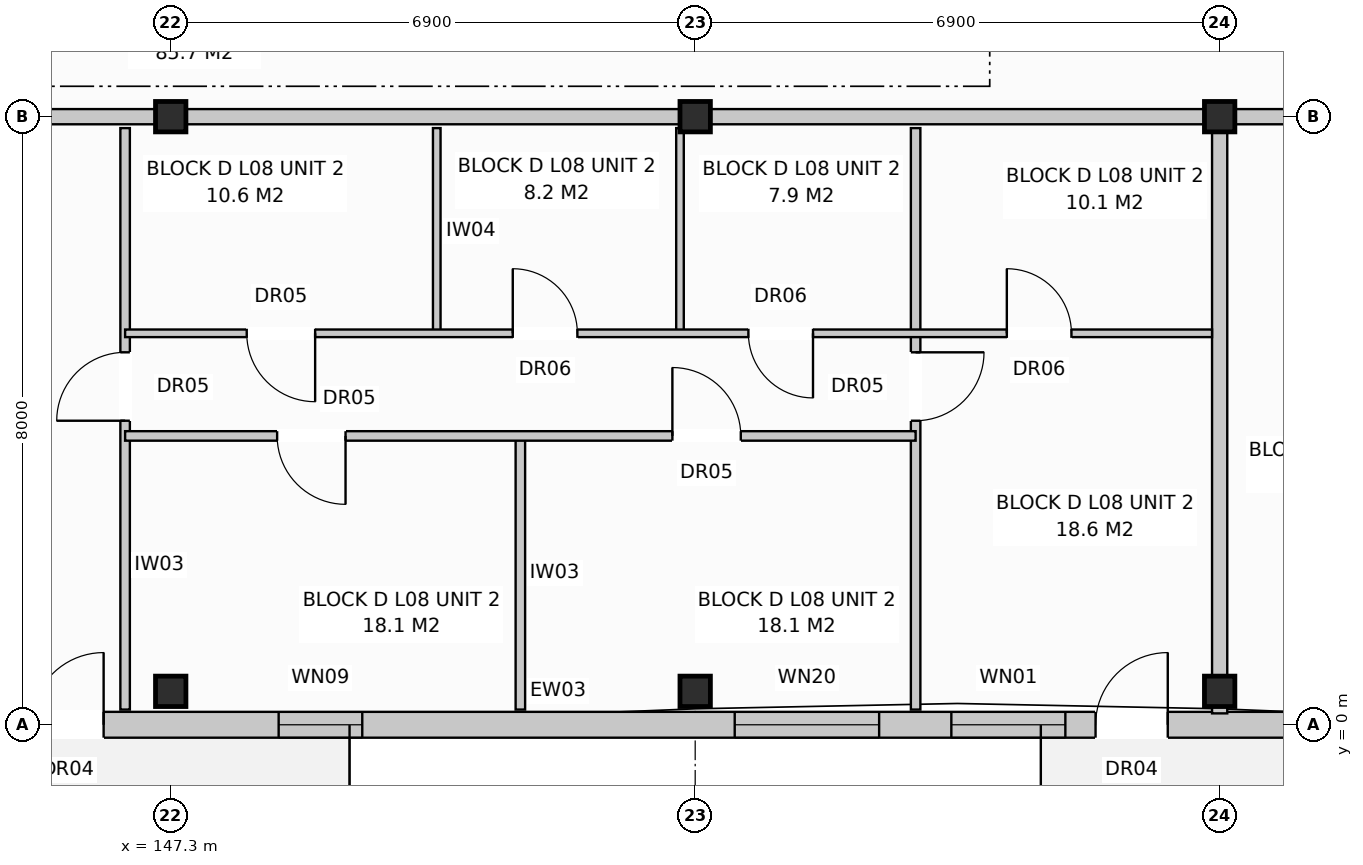
"""IFC4 building model, lengths in metres.
Left out: names, types, materials, properties, quantities, classifications, styles, units other than length and angle.
Written with IfcOpenShell. Run it as: python <this file> out.ifc"""

import sys

from ifc_helpers import new_model, si_unit, direction, frame, frame_2d, origin, origin_with_axes, origin_2d, place, context, subcontext, project, spatial, rectangle, extrude, element, fill, save


model = new_model("IFC4")
c1 = context("Model", 3, precision=1e-05, world=origin(), true_north=direction((0.0, 1.0)))
c2 = subcontext(c1, "Body", "Model", "MODEL_VIEW")
j1 = project(units=[si_unit("LENGTHUNIT", "METRE"), si_unit("PLANEANGLEUNIT", "RADIAN")], contexts=[c1])
p1 = place(None, origin())
s1 = spatial("IfcSite", under=j1, at=p1, CompositionType="ELEMENT")
p2 = place(p1, origin())
s2 = spatial("IfcBuilding", under=s1, at=p2, CompositionType="ELEMENT")
p3 = place(p2, frame((0.0, 0.0, 27.2)))
s3 = spatial("IfcBuildingStorey", under=s2, at=p3, CompositionType="ELEMENT", Elevation=27.2)
for number, where, z_axis, x_axis in (
    (1, (147.3, 0.44, 0.0), (0.0, 0.0, 1.0), (1.0, 0.0, 0.0)),
    (2, (147.3, 8.0, 0.0), (0.0, 0.0, 1.0), (1.0, 0.0, 0.0)),
    (3, (154.2, 0.44, 0.0), (0.0, 0.0, 1.0), (1.0, 0.0, 0.0)),
    (4, (154.2, 8.0, 0.0), (0.0, 0.0, 1.0), (1.0, 0.0, 0.0)),
    (5, (161.1, 0.44, 0.0), (0.0, 0.0, 1.0), (1.0, 0.0, 0.0)),
    (6, (161.1, 8.0, 0.0), (0.0, 0.0, 1.0), (1.0, 0.0, 0.0)),
):
    element("IfcColumn", number, at=place(p3, frame(where, z_axis=z_axis, x_axis=x_axis)), inside=s3, PredefinedType="COLUMN", context=c2, shape_type="SweptSolid", body=[
        extrude(rectangle(XDim=0.4, YDim=0.4, at=origin_2d()), origin(), (0.0, 0.0, 1.0), 3.2),
    ])
p4 = place(p3, frame((126.76, 0.0, 0.0), z_axis=(0.0, 0.0, 1.0), x_axis=(1.0, 0.0, 0.0)))
e7 = element("IfcWall", 7, at=p4, inside=s3, PredefinedType="STANDARD", context=c2, shape_type="SweptSolid", body=[
    extrude(rectangle(XDim=41.08, YDim=0.34, at=frame_2d((20.54, 0.0))), origin(), (0.0, 0.0, 1.0), 2.91),
])
p5 = place(p4, frame((7.41, 0.0, 0.0)))
e8 = element("IfcOpeningElement", 8, at=p5, cuts=e7, PredefinedType="OPENING", context=c2, shape_type="SweptSolid", body=[
    extrude(rectangle(XDim=0.95, YDim=2.1, at=frame_2d((0.475, 1.05))), frame((0.0, 0.182, 0.0), z_axis=(0.0, -1.0, 0.0), x_axis=(1.0, 0.0, 0.0)), (0.0, 0.0, 1.0), 0.364),
])
p6 = place(p4, frame((18.707, 0.0, 0.0)))
e9 = element("IfcOpeningElement", 9, at=p6, cuts=e7, PredefinedType="OPENING", context=c2, shape_type="SweptSolid", body=[
    extrude(rectangle(XDim=0.95, YDim=2.1, at=frame_2d((0.475, 1.05))), frame((0.0, 0.182, 0.0), z_axis=(0.0, -1.0, 0.0), x_axis=(1.0, 0.0, 0.0)), (0.0, 0.0, 1.0), 0.364),
])
p7 = place(p4, frame((32.707, 0.0, 0.0)))
e10 = element("IfcOpeningElement", 10, at=p7, cuts=e7, PredefinedType="OPENING", context=c2, shape_type="SweptSolid", body=[
    extrude(rectangle(XDim=0.95, YDim=2.1, at=frame_2d((0.475, 1.05))), frame((0.0, 0.182, 0.0), z_axis=(0.0, -1.0, 0.0), x_axis=(1.0, 0.0, 0.0)), (0.0, 0.0, 1.0), 0.364),
])
p8 = place(p4, frame((1.61, 0.0, 0.8)))
e11 = element("IfcOpeningElement", 11, at=p8, cuts=e7, PredefinedType="OPENING", context=c2, shape_type="SweptSolid", body=[
    extrude(rectangle(XDim=1.8, YDim=1.7, at=frame_2d((0.9, 0.85))), frame((0.0, 0.182, 0.0), z_axis=(0.0, -1.0, 0.0), x_axis=(1.0, 0.0, 0.0)), (0.0, 0.0, 1.0), 0.364),
])
p9 = place(p4, frame((10.46, 0.0, 0.8)))
e12 = element("IfcOpeningElement", 12, at=p9, cuts=e7, PredefinedType="OPENING", context=c2, shape_type="SweptSolid", body=[
    extrude(rectangle(XDim=1.9, YDim=1.85, at=frame_2d((0.95, 0.925))), frame((0.0, 0.182, 0.0), z_axis=(0.0, -1.0, 0.0), x_axis=(1.0, 0.0, 0.0)), (0.0, 0.0, 1.0), 0.364),
])
p10 = place(p4, frame((15.835, 0.0, 0.8)))
e13 = element("IfcOpeningElement", 13, at=p10, cuts=e7, PredefinedType="OPENING", context=c2, shape_type="SweptSolid", body=[
    extrude(rectangle(XDim=1.95, YDim=1.65, at=frame_2d((0.975, 0.825))), frame((0.0, 0.182, 0.0), z_axis=(0.0, -1.0, 0.0), x_axis=(1.0, 0.0, 0.0)), (0.0, 0.0, 1.0), 0.364),
])
p11 = place(p4, frame((21.96, 0.0, 0.72)))
e14 = element("IfcOpeningElement", 14, at=p11, cuts=e7, PredefinedType="OPENING", context=c2, shape_type="SweptSolid", body=[
    extrude(rectangle(XDim=1.1, YDim=1.5, at=frame_2d((0.55, 0.75))), frame((0.0, 0.182, 0.0), z_axis=(0.0, -1.0, 0.0), x_axis=(1.0, 0.0, 0.0)), (0.0, 0.0, 1.0), 0.364),
])
p12 = place(p4, frame((27.96, 0.0, 0.8)))
e15 = element("IfcOpeningElement", 15, at=p12, cuts=e7, PredefinedType="OPENING", context=c2, shape_type="SweptSolid", body=[
    extrude(rectangle(XDim=1.9, YDim=1.85, at=frame_2d((0.95, 0.925))), frame((0.0, 0.182, 0.0), z_axis=(0.0, -1.0, 0.0), x_axis=(1.0, 0.0, 0.0)), (0.0, 0.0, 1.0), 0.364),
])
p13 = place(p4, frame((30.81, 0.0, 0.85)))
e16 = element("IfcOpeningElement", 16, at=p13, cuts=e7, PredefinedType="OPENING", context=c2, shape_type="SweptSolid", body=[
    extrude(rectangle(XDim=1.5, YDim=1.65, at=frame_2d((0.75, 0.825))), frame((0.0, 0.182, 0.0), z_axis=(0.0, -1.0, 0.0), x_axis=(1.0, 0.0, 0.0)), (0.0, 0.0, 1.0), 0.364),
])
p14 = place(p4, frame((35.76, 0.0, 0.72)))
e17 = element("IfcOpeningElement", 17, at=p14, cuts=e7, PredefinedType="OPENING", context=c2, shape_type="SweptSolid", body=[
    extrude(rectangle(XDim=1.1, YDim=1.5, at=frame_2d((0.55, 0.75))), frame((0.0, 0.182, 0.0), z_axis=(0.0, -1.0, 0.0), x_axis=(1.0, 0.0, 0.0)), (0.0, 0.0, 1.0), 0.364),
])
p15 = place(p4, frame((38.575, 0.0, 0.8)))
e18 = element("IfcOpeningElement", 18, at=p15, cuts=e7, PredefinedType="OPENING", context=c2, shape_type="SweptSolid", body=[
    extrude(rectangle(XDim=1.9, YDim=1.85, at=frame_2d((0.95, 0.925))), frame((0.0, 0.182, 0.0), z_axis=(0.0, -1.0, 0.0), x_axis=(1.0, 0.0, 0.0)), (0.0, 0.0, 1.0), 0.364),
])
p16 = place(p3, frame((161.1, 7.85, 0.0), z_axis=(0.0, 0.0, 1.0), x_axis=(0.0, -1.0, 0.0)))
e19 = element("IfcWall", 19, at=p16, inside=s3, PredefinedType="PARTITIONING", context=c2, shape_type="SweptSolid", body=[
    extrude(rectangle(XDim=7.7, YDim=0.2, at=frame_2d((3.85, 0.0))), origin(), (0.0, 0.0, 1.0), 2.35),
])
p17 = place(p3, frame((140.4, 8.0, 0.0), z_axis=(0.0, 0.0, 1.0), x_axis=(1.0, 0.0, 0.0)))
e20 = element("IfcWall", 20, at=p17, inside=s3, PredefinedType="PARTITIONING", context=c2, shape_type="SweptSolid", body=[
    extrude(rectangle(XDim=20.7, YDim=0.2, at=frame_2d((10.35, 0.0))), origin(), (0.0, 0.0, 1.0), 2.35),
])
p18 = place(p17, frame((2.4, 0.0, 0.0)))
e21 = element("IfcOpeningElement", 21, at=p18, cuts=e20, PredefinedType="OPENING", context=c2, shape_type="SweptSolid", body=[
    extrude(rectangle(XDim=0.95, YDim=2.15, at=frame_2d((0.475, 1.075))), frame((0.0, 0.112, 0.0), z_axis=(0.0, -1.0, 0.0), x_axis=(1.0, 0.0, 0.0)), (0.0, 0.0, 1.0), 0.224),
])
p19 = place(p3, frame((146.7, 7.85, 0.0), z_axis=(0.0, 0.0, 1.0), x_axis=(0.0, -1.0, 0.0)))
e22 = element("IfcWall", 22, at=p19, inside=s3, PredefinedType="PARTITIONING", context=c2, shape_type="SweptSolid", body=[
    extrude(rectangle(XDim=7.65, YDim=0.125, at=frame_2d((3.825, 0.0))), origin(), (0.0, 0.0, 1.0), 2.96),
])
p20 = place(p19, frame((2.95, 0.0, 0.0)))
e23 = element("IfcOpeningElement", 23, at=p20, cuts=e22, PredefinedType="OPENING", context=c2, shape_type="SweptSolid", body=[
    extrude(rectangle(XDim=0.9, YDim=2.1, at=frame_2d((0.45, 1.05))), frame((0.0, 0.074, 0.0), z_axis=(0.0, -1.0, 0.0), x_axis=(1.0, 0.0, 0.0)), (0.0, 0.0, 1.0), 0.149),
])
for number, where, z_axis, x_axis in (
    (24, (150.8, 7.85, 0.0), (0.0, 0.0, 1.0), (0.0, -1.0, 0.0)),
    (25, (154.0, 7.85, 0.0), (0.0, 0.0, 1.0), (0.0, -1.0, 0.0)),
):
    element("IfcWall", number, at=place(p3, frame(where, z_axis=z_axis, x_axis=x_axis)), inside=s3, PredefinedType="PARTITIONING", context=c2, shape_type="SweptSolid", body=[
        extrude(rectangle(XDim=2.7, YDim=0.1, at=frame_2d((1.35, 0.0))), origin(), (0.0, 0.0, 1.0), 2.96),
    ])
p21 = place(p3, frame((151.9, 3.8, 0.0), z_axis=(0.0, 0.0, 1.0), x_axis=(0.0, -1.0, 0.0)))
e26 = element("IfcWall", 26, at=p21, inside=s3, PredefinedType="PARTITIONING", context=c2, shape_type="SweptSolid", body=[
    extrude(rectangle(XDim=3.6, YDim=0.125, at=frame_2d((1.8, 0.0))), origin(), (0.0, 0.0, 1.0), 2.96),
])
p22 = place(p3, frame((157.1, 7.85, 0.0), z_axis=(0.0, 0.0, 1.0), x_axis=(0.0, -1.0, 0.0)))
e27 = element("IfcWall", 27, at=p22, inside=s3, PredefinedType="PARTITIONING", context=c2, shape_type="SweptSolid", body=[
    extrude(rectangle(XDim=7.65, YDim=0.125, at=frame_2d((3.825, 0.0))), origin(), (0.0, 0.0, 1.0), 2.96),
])
p23 = place(p22, frame((2.95, 0.0, 0.0)))
e28 = element("IfcOpeningElement", 28, at=p23, cuts=e27, PredefinedType="OPENING", context=c2, shape_type="SweptSolid", body=[
    extrude(rectangle(XDim=0.9, YDim=2.1, at=frame_2d((0.45, 1.05))), frame((0.0, 0.074, 0.0), z_axis=(0.0, -1.0, 0.0), x_axis=(1.0, 0.0, 0.0)), (0.0, 0.0, 1.0), 0.149),
])
p24 = place(p3, frame((146.7, 5.15, 0.0), z_axis=(0.0, 0.0, 1.0), x_axis=(1.0, 0.0, 0.0)))
e29 = element("IfcWall", 29, at=p24, inside=s3, PredefinedType="PARTITIONING", context=c2, shape_type="SweptSolid", body=[
    extrude(rectangle(XDim=14.3, YDim=0.1, at=frame_2d((7.15, 0.0))), origin(), (0.0, 0.0, 1.0), 2.96),
])
p25 = place(p24, frame((1.6, 0.0, 0.0)))
e30 = element("IfcOpeningElement", 30, at=p25, cuts=e29, PredefinedType="OPENING", context=c2, shape_type="SweptSolid", body=[
    extrude(rectangle(XDim=0.9, YDim=2.1, at=frame_2d((0.45, 1.05))), frame((0.0, 0.062, 0.0), z_axis=(0.0, -1.0, 0.0), x_axis=(1.0, 0.0, 0.0)), (0.0, 0.0, 1.0), 0.124),
])
p26 = place(p24, frame((5.1, 0.0, 0.0)))
e31 = element("IfcOpeningElement", 31, at=p26, cuts=e29, PredefinedType="OPENING", context=c2, shape_type="SweptSolid", body=[
    extrude(rectangle(XDim=0.85, YDim=2.05, at=frame_2d((0.425, 1.025))), frame((0.0, 0.062, 0.0), z_axis=(0.0, -1.0, 0.0), x_axis=(1.0, 0.0, 0.0)), (0.0, 0.0, 1.0), 0.124),
])
p27 = place(p24, frame((8.2, 0.0, 0.0)))
e32 = element("IfcOpeningElement", 32, at=p27, cuts=e29, PredefinedType="OPENING", context=c2, shape_type="SweptSolid", body=[
    extrude(rectangle(XDim=0.85, YDim=2.05, at=frame_2d((0.425, 1.025))), frame((0.0, 0.062, 0.0), z_axis=(0.0, -1.0, 0.0), x_axis=(1.0, 0.0, 0.0)), (0.0, 0.0, 1.0), 0.124),
])
p28 = place(p24, frame((11.6, 0.0, 0.0)))
e33 = element("IfcOpeningElement", 33, at=p28, cuts=e29, PredefinedType="OPENING", context=c2, shape_type="SweptSolid", body=[
    extrude(rectangle(XDim=0.85, YDim=2.05, at=frame_2d((0.425, 1.025))), frame((0.0, 0.062, 0.0), z_axis=(0.0, -1.0, 0.0), x_axis=(1.0, 0.0, 0.0)), (0.0, 0.0, 1.0), 0.124),
])
p29 = place(p3, frame((146.7, 3.8, 0.0), z_axis=(0.0, 0.0, 1.0), x_axis=(1.0, 0.0, 0.0)))
e34 = element("IfcWall", 34, at=p29, inside=s3, PredefinedType="PARTITIONING", context=c2, shape_type="SweptSolid", body=[
    extrude(rectangle(XDim=10.4, YDim=0.125, at=frame_2d((5.2, 0.0))), origin(), (0.0, 0.0, 1.0), 2.96),
])
p30 = place(p29, frame((2.0, 0.0, 0.0)))
e35 = element("IfcOpeningElement", 35, at=p30, cuts=e34, PredefinedType="OPENING", context=c2, shape_type="SweptSolid", body=[
    extrude(rectangle(XDim=0.9, YDim=2.1, at=frame_2d((0.45, 1.05))), frame((0.0, 0.074, 0.0), z_axis=(0.0, -1.0, 0.0), x_axis=(1.0, 0.0, 0.0)), (0.0, 0.0, 1.0), 0.149),
])
p31 = place(p29, frame((7.2, 0.0, 0.0)))
e36 = element("IfcOpeningElement", 36, at=p31, cuts=e34, PredefinedType="OPENING", context=c2, shape_type="SweptSolid", body=[
    extrude(rectangle(XDim=0.9, YDim=2.1, at=frame_2d((0.45, 1.05))), frame((0.0, 0.074, 0.0), z_axis=(0.0, -1.0, 0.0), x_axis=(1.0, 0.0, 0.0)), (0.0, 0.0, 1.0), 0.149),
])
p32 = place(p3, frame((161.1, 8.0, 0.0), z_axis=(0.0, 0.0, 1.0), x_axis=(1.0, 0.0, 0.0)))
e37 = element("IfcWall", 37, at=p32, inside=s3, PredefinedType="PARTITIONING", context=c2, shape_type="SweptSolid", body=[
    extrude(rectangle(XDim=6.9, YDim=0.2, at=frame_2d((3.45, 0.0))), origin(), (0.0, 0.0, 1.0), 2.35),
])
p33 = place(p32, frame((2.0, 0.0, 0.0)))
e38 = element("IfcOpeningElement", 38, at=p33, cuts=e37, PredefinedType="OPENING", context=c2, shape_type="SweptSolid", body=[
    extrude(rectangle(XDim=0.95, YDim=2.15, at=frame_2d((0.475, 1.075))), frame((0.0, 0.112, 0.0), z_axis=(0.0, -1.0, 0.0), x_axis=(1.0, 0.0, 0.0)), (0.0, 0.0, 1.0), 0.224),
])
p34 = place(p6, origin_with_axes())
e39 = element("IfcDoor", 39, at=p34, inside=s3, OperationType="SINGLE_SWING_RIGHT", PredefinedType="DOOR", context=c2, shape_type="SweptSolid", body=[
    extrude(rectangle(XDim=0.95, YDim=2.1, at=frame_2d((0.475, 1.05))), frame((0.0, 0.025, 0.0), z_axis=(0.0, -1.0, 0.0), x_axis=(1.0, 0.0, 0.0)), (0.0, 0.0, 1.0), 0.05),
])
fill(e9, e39)
p35 = place(p7, origin_with_axes())
e40 = element("IfcDoor", 40, at=p35, inside=s3, OperationType="SINGLE_SWING_RIGHT", PredefinedType="DOOR", context=c2, shape_type="SweptSolid", body=[
    extrude(rectangle(XDim=0.95, YDim=2.1, at=frame_2d((0.475, 1.05))), frame((0.0, 0.025, 0.0), z_axis=(0.0, -1.0, 0.0), x_axis=(1.0, 0.0, 0.0)), (0.0, 0.0, 1.0), 0.05),
])
fill(e10, e40)
p36 = place(p11, origin_with_axes())
e41 = element("IfcWindow", 41, at=p36, inside=s3, PartitioningType="SINGLE_PANEL", PredefinedType="WINDOW", context=c2, shape_type="SweptSolid", body=[
    extrude(rectangle(XDim=1.1, YDim=1.5, at=frame_2d((0.55, 0.75))), frame((0.0, 0.03, 0.0), z_axis=(0.0, -1.0, 0.0), x_axis=(1.0, 0.0, 0.0)), (0.0, 0.0, 1.0), 0.06),
])
fill(e14, e41)
p37 = place(p12, origin_with_axes())
e42 = element("IfcWindow", 42, at=p37, inside=s3, PartitioningType="SINGLE_PANEL", PredefinedType="WINDOW", context=c2, shape_type="SweptSolid", body=[
    extrude(rectangle(XDim=1.9, YDim=1.85, at=frame_2d((0.95, 0.925))), frame((0.0, 0.03, 0.0), z_axis=(0.0, -1.0, 0.0), x_axis=(1.0, 0.0, 0.0)), (0.0, 0.0, 1.0), 0.06),
])
fill(e15, e42)
p38 = place(p13, origin_with_axes())
e43 = element("IfcWindow", 43, at=p38, inside=s3, PartitioningType="SINGLE_PANEL", PredefinedType="WINDOW", context=c2, shape_type="SweptSolid", body=[
    extrude(rectangle(XDim=1.5, YDim=1.65, at=frame_2d((0.75, 0.825))), frame((0.0, 0.03, 0.0), z_axis=(0.0, -1.0, 0.0), x_axis=(1.0, 0.0, 0.0)), (0.0, 0.0, 1.0), 0.06),
])
fill(e16, e43)
p39 = place(p20, frame((0.9, 0.0, 0.0), z_axis=(0.0, 0.0, 1.0), x_axis=(-1.0, 0.0, 0.0)))
e44 = element("IfcDoor", 44, at=p39, inside=s3, OperationType="SINGLE_SWING_RIGHT", PredefinedType="DOOR", context=c2, shape_type="SweptSolid", body=[
    extrude(rectangle(XDim=0.9, YDim=2.1, at=frame_2d((0.45, 1.05))), frame((0.0, 0.025, 0.0), z_axis=(0.0, -1.0, 0.0), x_axis=(1.0, 0.0, 0.0)), (0.0, 0.0, 1.0), 0.05),
])
fill(e23, e44)
p40 = place(p23, origin_with_axes())
e45 = element("IfcDoor", 45, at=p40, inside=s3, OperationType="SINGLE_SWING_LEFT", PredefinedType="DOOR", context=c2, shape_type="SweptSolid", body=[
    extrude(rectangle(XDim=0.9, YDim=2.1, at=frame_2d((0.45, 1.05))), frame((0.0, 0.025, 0.0), z_axis=(0.0, -1.0, 0.0), x_axis=(1.0, 0.0, 0.0)), (0.0, 0.0, 1.0), 0.05),
])
fill(e28, e45)
p41 = place(p25, frame((0.9, 0.0, 0.0), z_axis=(0.0, 0.0, 1.0), x_axis=(-1.0, 0.0, 0.0)))
e46 = element("IfcDoor", 46, at=p41, inside=s3, OperationType="SINGLE_SWING_RIGHT", PredefinedType="DOOR", context=c2, shape_type="SweptSolid", body=[
    extrude(rectangle(XDim=0.9, YDim=2.1, at=frame_2d((0.45, 1.05))), frame((0.0, 0.025, 0.0), z_axis=(0.0, -1.0, 0.0), x_axis=(1.0, 0.0, 0.0)), (0.0, 0.0, 1.0), 0.05),
])
fill(e30, e46)
p42 = place(p26, origin_with_axes())
e47 = element("IfcDoor", 47, at=p42, inside=s3, OperationType="SINGLE_SWING_LEFT", PredefinedType="DOOR", context=c2, shape_type="SweptSolid", body=[
    extrude(rectangle(XDim=0.85, YDim=2.05, at=frame_2d((0.425, 1.025))), frame((0.0, 0.025, 0.0), z_axis=(0.0, -1.0, 0.0), x_axis=(1.0, 0.0, 0.0)), (0.0, 0.0, 1.0), 0.05),
])
fill(e31, e47)
p43 = place(p27, frame((0.85, 0.0, 0.0), z_axis=(0.0, 0.0, 1.0), x_axis=(-1.0, 0.0, 0.0)))
e48 = element("IfcDoor", 48, at=p43, inside=s3, OperationType="SINGLE_SWING_RIGHT", PredefinedType="DOOR", context=c2, shape_type="SweptSolid", body=[
    extrude(rectangle(XDim=0.85, YDim=2.05, at=frame_2d((0.425, 1.025))), frame((0.0, 0.025, 0.0), z_axis=(0.0, -1.0, 0.0), x_axis=(1.0, 0.0, 0.0)), (0.0, 0.0, 1.0), 0.05),
])
fill(e32, e48)
p44 = place(p28, origin_with_axes())
e49 = element("IfcDoor", 49, at=p44, inside=s3, OperationType="SINGLE_SWING_LEFT", PredefinedType="DOOR", context=c2, shape_type="SweptSolid", body=[
    extrude(rectangle(XDim=0.85, YDim=2.05, at=frame_2d((0.425, 1.025))), frame((0.0, 0.025, 0.0), z_axis=(0.0, -1.0, 0.0), x_axis=(1.0, 0.0, 0.0)), (0.0, 0.0, 1.0), 0.05),
])
fill(e33, e49)
p45 = place(p30, frame((0.9, 0.0, 0.0), z_axis=(0.0, 0.0, 1.0), x_axis=(-1.0, 0.0, 0.0)))
e50 = element("IfcDoor", 50, at=p45, inside=s3, OperationType="SINGLE_SWING_RIGHT", PredefinedType="DOOR", context=c2, shape_type="SweptSolid", body=[
    extrude(rectangle(XDim=0.9, YDim=2.1, at=frame_2d((0.45, 1.05))), frame((0.0, 0.025, 0.0), z_axis=(0.0, -1.0, 0.0), x_axis=(1.0, 0.0, 0.0)), (0.0, 0.0, 1.0), 0.05),
])
fill(e35, e50)
p46 = place(p31, origin_with_axes())
e51 = element("IfcDoor", 51, at=p46, inside=s3, OperationType="SINGLE_SWING_LEFT", PredefinedType="DOOR", context=c2, shape_type="SweptSolid", body=[
    extrude(rectangle(XDim=0.9, YDim=2.1, at=frame_2d((0.45, 1.05))), frame((0.0, 0.025, 0.0), z_axis=(0.0, -1.0, 0.0), x_axis=(1.0, 0.0, 0.0)), (0.0, 0.0, 1.0), 0.05),
])
fill(e36, e51)
save(model, sys.argv[1])
